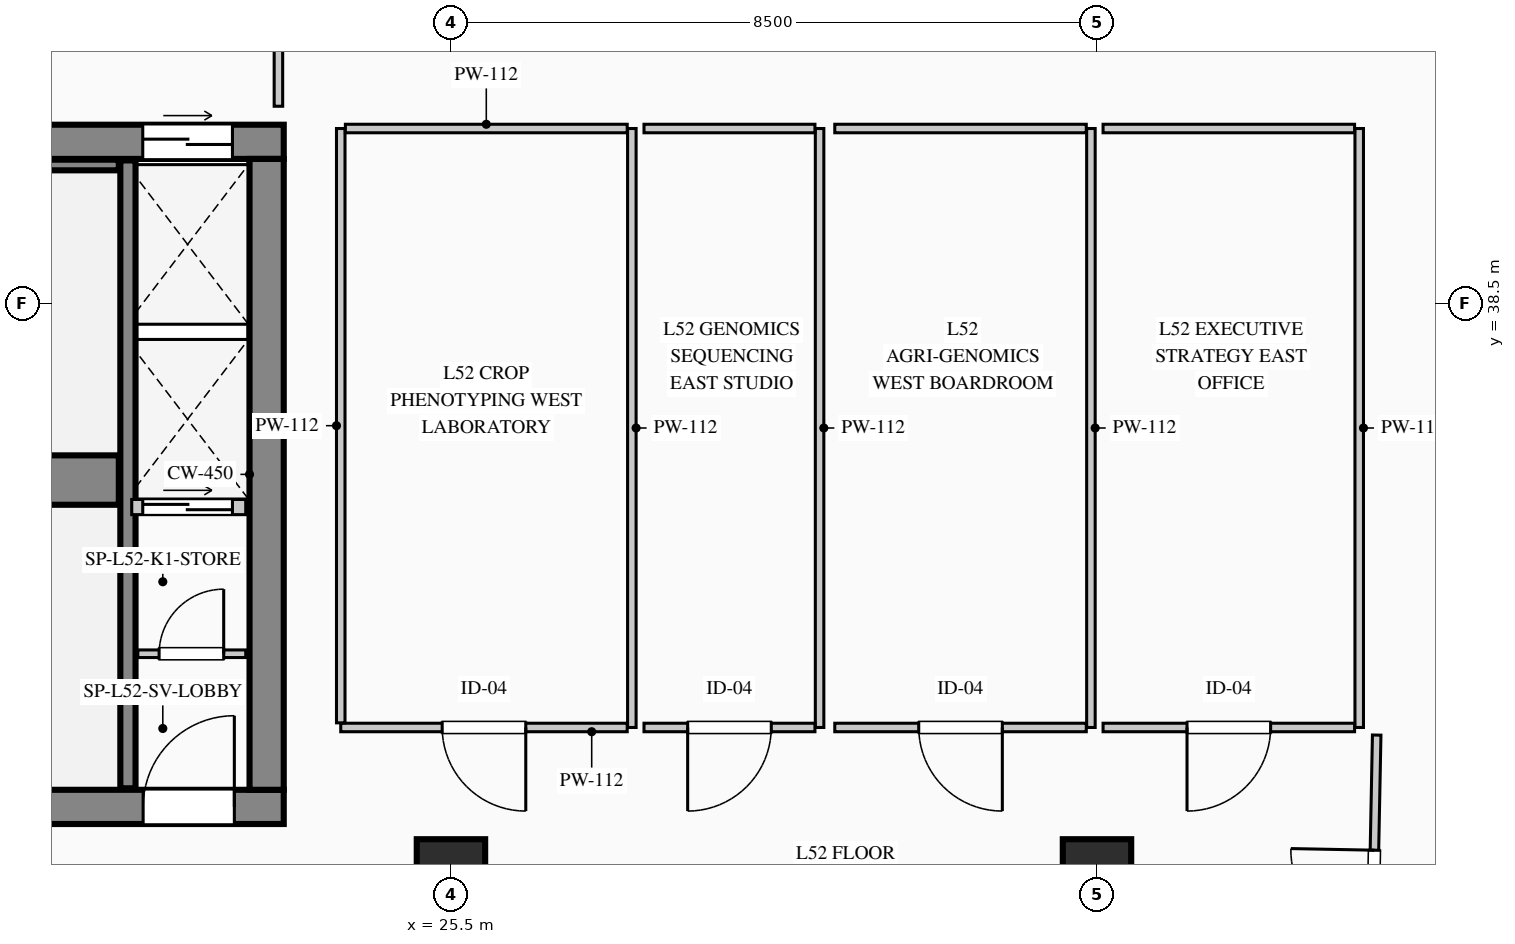
"""IFC4 building model, lengths in metres.
Left out: names, types, materials, properties, quantities, classifications, styles, units other than length and angle.
Written with IfcOpenShell. Run it as: python <this file> out.ifc"""

import sys

from ifc_helpers import new_model, si_unit, direction, frame, frame_2d, origin, origin_2d, place, context, subcontext, project, spatial, rectangle, extrude, element, fill, save


model = new_model("IFC4")
c1 = context("Model", 3, precision=1e-05, world=origin(), true_north=direction((0.0, 1.0)))
c2 = subcontext(c1, "Body", "Model", "MODEL_VIEW")
j1 = project(units=[si_unit("LENGTHUNIT", "METRE"), si_unit("PLANEANGLEUNIT", "RADIAN")], contexts=[c1])
p1 = place(None, origin())
s1 = spatial("IfcSite", under=j1, at=p1, CompositionType="ELEMENT")
p2 = place(p1, origin())
s2 = spatial("IfcBuilding", under=s1, at=p2, CompositionType="ELEMENT")
p3 = place(p2, frame((0.0, 0.0, 219.3)))
s3 = spatial("IfcBuildingStorey", under=s2, at=p3, CompositionType="ELEMENT", Elevation=219.3)
p4 = place(p3, frame((5.55, 40.625, 0.0), z_axis=(0.0, 0.0, 1.0), x_axis=(1.0, 0.0, 0.0)))
e1 = element("IfcWall", 1, at=p4, inside=s3, PredefinedType="SHEAR", context=c2, shape_type="SweptSolid", body=[
    extrude(rectangle(XDim=17.75, YDim=0.45, at=frame_2d((8.875, 0.0))), origin(), (0.0, 0.0, 1.0), 3.95),
])
p5 = place(p4, frame((15.895, 0.0, 0.0)))
e2 = element("IfcOpeningElement", 2, at=p5, cuts=e1, PredefinedType="OPENING", context=c2, shape_type="SweptSolid", body=[
    extrude(rectangle(XDim=1.18, YDim=2.25, at=frame_2d((0.59, 1.125))), frame((0.0, 0.235, 0.0), z_axis=(0.0, -1.0, 0.0), x_axis=(1.0, 0.0, 0.0)), (0.0, 0.0, 1.0), 0.47),
])
p6 = place(p3, frame((5.55, 31.875, 0.0), z_axis=(0.0, 0.0, 1.0), x_axis=(1.0, 0.0, 0.0)))
e3 = element("IfcWall", 3, at=p6, inside=s3, PredefinedType="SHEAR", context=c2, shape_type="SweptSolid", body=[
    extrude(rectangle(XDim=17.75, YDim=0.45, at=frame_2d((8.875, 0.0))), origin(), (0.0, 0.0, 1.0), 3.95),
])
p7 = place(p6, frame((3.1, 0.0, 0.0)))
e4 = element("IfcOpeningElement", 4, at=p7, cuts=e3, PredefinedType="OPENING", context=c2, shape_type="SweptSolid", body=[
    extrude(rectangle(XDim=1.2, YDim=2.2, at=frame_2d((0.6, 1.1))), frame((0.0, 0.235, 0.0), z_axis=(0.0, -1.0, 0.0), x_axis=(1.0, 0.0, 0.0)), (0.0, 0.0, 1.0), 0.47),
])
p8 = place(p6, frame((6.95, 0.0, 0.0)))
e5 = element("IfcOpeningElement", 5, at=p8, cuts=e3, PredefinedType="OPENING", context=c2, shape_type="SweptSolid", body=[
    extrude(rectangle(XDim=1.2, YDim=2.2, at=frame_2d((0.6, 1.1))), frame((0.0, 0.235, 0.0), z_axis=(0.0, -1.0, 0.0), x_axis=(1.0, 0.0, 0.0)), (0.0, 0.0, 1.0), 0.47),
])
p9 = place(p6, frame((8.8, 0.0, 0.0)))
e6 = element("IfcOpeningElement", 6, at=p9, cuts=e3, PredefinedType="OPENING", context=c2, shape_type="SweptSolid", body=[
    extrude(rectangle(XDim=1.15, YDim=2.2, at=frame_2d((0.575, 1.1))), frame((0.0, 0.235, 0.0), z_axis=(0.0, -1.0, 0.0), x_axis=(1.0, 0.0, 0.0)), (0.0, 0.0, 1.0), 0.47),
])
p10 = place(p6, frame((15.9, 0.0, 0.0)))
e7 = element("IfcOpeningElement", 7, at=p10, cuts=e3, PredefinedType="OPENING", context=c2, shape_type="SweptSolid", body=[
    extrude(rectangle(XDim=1.2, YDim=2.2, at=frame_2d((0.6, 1.1))), frame((0.0, 0.235, 0.0), z_axis=(0.0, -1.0, 0.0), x_axis=(1.0, 0.0, 0.0)), (0.0, 0.0, 1.0), 0.47),
])
p11 = place(p3, frame((23.075, 32.1, 0.0), z_axis=(0.0, 0.0, 1.0), x_axis=(0.0, 1.0, 0.0)))
e8 = element("IfcWall", 8, at=p11, inside=s3, PredefinedType="SHEAR", context=c2, shape_type="SweptSolid", body=[
    extrude(rectangle(XDim=8.3, YDim=0.45, at=frame_2d((4.15, 0.0))), origin(), (0.0, 0.0, 1.0), 3.95),
])
p12 = place(p3, frame((14.12, 36.175, 0.0), z_axis=(0.0, 0.0, 1.0), x_axis=(1.0, 0.0, 0.0)))
e9 = element("IfcWall", 9, at=p12, inside=s3, PredefinedType="SHEAR", context=c2, shape_type="SweptSolid", body=[
    extrude(rectangle(XDim=7.01, YDim=0.65, at=frame_2d((3.505, 0.0))), origin(), (0.0, 0.0, 1.0), 3.95),
])
p13 = place(p3, frame((21.25, 32.12, 0.0), z_axis=(0.0, 0.0, 1.0), x_axis=(0.0, 1.0, 0.0)))
e10 = element("IfcWall", 10, at=p13, inside=s3, PredefinedType="SHEAR", context=c2, shape_type="SweptSolid", body=[
    extrude(rectangle(XDim=8.26, YDim=0.2, at=frame_2d((4.13, 0.0))), origin(), (0.0, 0.0, 1.0), 3.95),
])
p14 = place(p3, frame((14.12, 40.32, 0.0), z_axis=(0.0, 0.0, 1.0), x_axis=(1.0, 0.0, 0.0)))
e11 = element("IfcWall", 11, at=p14, inside=s3, PredefinedType="SHEAR", context=c2, shape_type="SweptSolid", body=[
    extrude(rectangle(XDim=7.01, YDim=0.14, at=frame_2d((3.505, 0.0))), origin(), (0.0, 0.0, 1.0), 3.95),
])
for number, where, z_axis, x_axis in (
    (12, (25.5, 31.0, 0.0), (0.0, 0.0, 1.0), (1.0, 0.0, 0.0)),
    (13, (34.0, 31.0, 0.0), (0.0, 0.0, 1.0), (1.0, 0.0, 0.0)),
):
    element("IfcColumn", number, at=place(p3, frame(where, z_axis=z_axis, x_axis=x_axis)), inside=s3, PredefinedType="COLUMN", context=c2, shape_type="SweptSolid", body=[
        extrude(rectangle(XDim=0.9, YDim=0.9, at=origin_2d()), origin(), (0.0, 0.0, 1.0), 3.95),
    ])
p15 = place(p3, frame((21.38, 33.89, 0.0), z_axis=(0.0, 0.0, 1.0), x_axis=(1.0, 0.0, 0.0)))
e14 = element("IfcWall", 14, at=p15, inside=s3, PredefinedType="PARTITIONING", context=c2, shape_type="SweptSolid", body=[
    extrude(rectangle(XDim=1.42, YDim=0.1, at=frame_2d((0.71, 0.0))), origin(), (0.0, 0.0, 1.0), 3.7),
])
p16 = place(p15, frame((0.28, 0.0, 0.0)))
e15 = element("IfcOpeningElement", 15, at=p16, cuts=e14, PredefinedType="OPENING", context=c2, shape_type="SweptSolid", body=[
    extrude(rectangle(XDim=0.85, YDim=2.1, at=frame_2d((0.425, 1.05))), frame((0.0, 0.06, 0.0), z_axis=(0.0, -1.0, 0.0), x_axis=(1.0, 0.0, 0.0)), (0.0, 0.0, 1.0), 0.12),
])
p17 = place(p3, frame((21.3, 35.82, 0.0), z_axis=(0.0, 0.0, 1.0), x_axis=(1.0, 0.0, 0.0)))
e16 = element("IfcWall", 16, at=p17, inside=s3, PredefinedType="PARTITIONING", context=c2, shape_type="SweptSolid", body=[
    extrude(rectangle(XDim=1.5, YDim=0.2, at=frame_2d((0.75, 0.0))), origin(), (0.0, 0.0, 1.0), 3.7),
])
p18 = place(p17, frame((0.145, 0.0, 0.0)))
e17 = element("IfcOpeningElement", 17, at=p18, cuts=e16, PredefinedType="OPENING", context=c2, shape_type="SweptSolid", body=[
    extrude(rectangle(XDim=1.18, YDim=2.25, at=frame_2d((0.59, 1.125))), frame((0.0, 0.11, 0.0), z_axis=(0.0, -1.0, 0.0), x_axis=(1.0, 0.0, 0.0)), (0.0, 0.0, 1.0), 0.22),
])
p19 = place(p3, frame((27.88, 40.8, 0.0), z_axis=(0.0, 0.0, 1.0), x_axis=(0.0, -1.0, 0.0)))
e18 = element("IfcWall", 18, at=p19, inside=s3, PredefinedType="PARTITIONING", context=c2, shape_type="SweptSolid", body=[
    extrude(rectangle(XDim=7.88, YDim=0.112, at=frame_2d((3.94, 0.0))), origin(), (0.0, 0.0, 1.0), 3.7),
])
p20 = place(p3, frame((27.819, 32.92, 0.0), z_axis=(0.0, 0.0, 1.0), x_axis=(-1.0, 0.0, 0.0)))
e19 = element("IfcWall", 19, at=p20, inside=s3, PredefinedType="PARTITIONING", context=c2, shape_type="SweptSolid", body=[
    extrude(rectangle(XDim=3.769, YDim=0.112, at=frame_2d((1.885, 0.0))), origin(), (0.0, 0.0, 1.0), 3.7),
])
p21 = place(p20, frame((1.334, 0.0, 0.0)))
e20 = element("IfcOpeningElement", 20, at=p21, cuts=e19, PredefinedType="OPENING", context=c2, shape_type="SweptSolid", body=[
    extrude(rectangle(XDim=1.1, YDim=2.2, at=frame_2d((0.55, 1.1))), frame((0.0, 0.066, 0.0), z_axis=(0.0, -1.0, 0.0), x_axis=(1.0, 0.0, 0.0)), (0.0, 0.0, 1.0), 0.132),
])
p22 = place(p3, frame((24.05, 32.981, 0.0), z_axis=(0.0, 0.0, 1.0), x_axis=(0.0, 1.0, 0.0)))
e21 = element("IfcWall", 21, at=p22, inside=s3, PredefinedType="PARTITIONING", context=c2, shape_type="SweptSolid", body=[
    extrude(rectangle(XDim=7.819, YDim=0.112, at=frame_2d((3.91, 0.0))), origin(), (0.0, 0.0, 1.0), 3.7),
])
p23 = place(p3, frame((24.111, 40.8, 0.0), z_axis=(0.0, 0.0, 1.0), x_axis=(1.0, 0.0, 0.0)))
e22 = element("IfcWall", 22, at=p23, inside=s3, PredefinedType="PARTITIONING", context=c2, shape_type="SweptSolid", body=[
    extrude(rectangle(XDim=3.708, YDim=0.112, at=frame_2d((1.854, 0.0))), origin(), (0.0, 0.0, 1.0), 3.7),
])
p24 = place(p3, frame((30.35, 40.8, 0.0), z_axis=(0.0, 0.0, 1.0), x_axis=(0.0, -1.0, 0.0)))
e23 = element("IfcWall", 23, at=p24, inside=s3, PredefinedType="PARTITIONING", context=c2, shape_type="SweptSolid", body=[
    extrude(rectangle(XDim=7.88, YDim=0.112, at=frame_2d((3.94, 0.0))), origin(), (0.0, 0.0, 1.0), 3.7),
])
p25 = place(p3, frame((30.289, 32.92, 0.0), z_axis=(0.0, 0.0, 1.0), x_axis=(-1.0, 0.0, 0.0)))
e24 = element("IfcWall", 24, at=p25, inside=s3, PredefinedType="PARTITIONING", context=c2, shape_type="SweptSolid", body=[
    extrude(rectangle(XDim=2.249, YDim=0.112, at=frame_2d((1.125, 0.0))), origin(), (0.0, 0.0, 1.0), 3.7),
])
p26 = place(p25, frame((0.574, 0.0, 0.0)))
e25 = element("IfcOpeningElement", 25, at=p26, cuts=e24, PredefinedType="OPENING", context=c2, shape_type="SweptSolid", body=[
    extrude(rectangle(XDim=1.1, YDim=2.2, at=frame_2d((0.55, 1.1))), frame((0.0, 0.066, 0.0), z_axis=(0.0, -1.0, 0.0), x_axis=(1.0, 0.0, 0.0)), (0.0, 0.0, 1.0), 0.132),
])
p27 = place(p3, frame((28.04, 40.8, 0.0), z_axis=(0.0, 0.0, 1.0), x_axis=(1.0, 0.0, 0.0)))
e26 = element("IfcWall", 26, at=p27, inside=s3, PredefinedType="PARTITIONING", context=c2, shape_type="SweptSolid", body=[
    extrude(rectangle(XDim=2.249, YDim=0.112, at=frame_2d((1.125, 0.0))), origin(), (0.0, 0.0, 1.0), 3.7),
])
p28 = place(p3, frame((33.92, 40.8, 0.0), z_axis=(0.0, 0.0, 1.0), x_axis=(0.0, -1.0, 0.0)))
e27 = element("IfcWall", 27, at=p28, inside=s3, PredefinedType="PARTITIONING", context=c2, shape_type="SweptSolid", body=[
    extrude(rectangle(XDim=7.88, YDim=0.112, at=frame_2d((3.94, 0.0))), origin(), (0.0, 0.0, 1.0), 3.7),
])
p29 = place(p3, frame((33.859, 32.92, 0.0), z_axis=(0.0, 0.0, 1.0), x_axis=(-1.0, 0.0, 0.0)))
e28 = element("IfcWall", 28, at=p29, inside=s3, PredefinedType="PARTITIONING", context=c2, shape_type="SweptSolid", body=[
    extrude(rectangle(XDim=3.309, YDim=0.112, at=frame_2d((1.654, 0.0))), origin(), (0.0, 0.0, 1.0), 3.7),
])
p30 = place(p29, frame((1.104, 0.0, 0.0)))
e29 = element("IfcOpeningElement", 29, at=p30, cuts=e28, PredefinedType="OPENING", context=c2, shape_type="SweptSolid", body=[
    extrude(rectangle(XDim=1.1, YDim=2.2, at=frame_2d((0.55, 1.1))), frame((0.0, 0.066, 0.0), z_axis=(0.0, -1.0, 0.0), x_axis=(1.0, 0.0, 0.0)), (0.0, 0.0, 1.0), 0.132),
])
p31 = place(p3, frame((30.55, 40.8, 0.0), z_axis=(0.0, 0.0, 1.0), x_axis=(1.0, 0.0, 0.0)))
e30 = element("IfcWall", 30, at=p31, inside=s3, PredefinedType="PARTITIONING", context=c2, shape_type="SweptSolid", body=[
    extrude(rectangle(XDim=3.309, YDim=0.112, at=frame_2d((1.654, 0.0))), origin(), (0.0, 0.0, 1.0), 3.7),
])
p32 = place(p3, frame((37.45, 40.8, 0.0), z_axis=(0.0, 0.0, 1.0), x_axis=(0.0, -1.0, 0.0)))
e31 = element("IfcWall", 31, at=p32, inside=s3, PredefinedType="PARTITIONING", context=c2, shape_type="SweptSolid", body=[
    extrude(rectangle(XDim=7.88, YDim=0.112, at=frame_2d((3.94, 0.0))), origin(), (0.0, 0.0, 1.0), 3.7),
])
p33 = place(p3, frame((37.389, 32.92, 0.0), z_axis=(0.0, 0.0, 1.0), x_axis=(-1.0, 0.0, 0.0)))
e32 = element("IfcWall", 32, at=p33, inside=s3, PredefinedType="PARTITIONING", context=c2, shape_type="SweptSolid", body=[
    extrude(rectangle(XDim=3.309, YDim=0.112, at=frame_2d((1.654, 0.0))), origin(), (0.0, 0.0, 1.0), 3.7),
])
p34 = place(p33, frame((1.104, 0.0, 0.0)))
e33 = element("IfcOpeningElement", 33, at=p34, cuts=e32, PredefinedType="OPENING", context=c2, shape_type="SweptSolid", body=[
    extrude(rectangle(XDim=1.1, YDim=2.2, at=frame_2d((0.55, 1.1))), frame((0.0, 0.066, 0.0), z_axis=(0.0, -1.0, 0.0), x_axis=(1.0, 0.0, 0.0)), (0.0, 0.0, 1.0), 0.132),
])
p35 = place(p3, frame((34.08, 40.8, 0.0), z_axis=(0.0, 0.0, 1.0), x_axis=(1.0, 0.0, 0.0)))
e34 = element("IfcWall", 34, at=p35, inside=s3, PredefinedType="PARTITIONING", context=c2, shape_type="SweptSolid", body=[
    extrude(rectangle(XDim=3.309, YDim=0.112, at=frame_2d((1.654, 0.0))), origin(), (0.0, 0.0, 1.0), 3.7),
])
p36 = place(p3, frame((37.599, 28.691, 0.0), z_axis=(0.0, 0.0, 1.0), x_axis=(0.019566997539, 0.999808547977, 0.0)))
e35 = element("IfcWall", 35, at=p36, inside=s3, PredefinedType="PARTITIONING", context=c2, shape_type="SweptSolid", body=[
    extrude(rectangle(XDim=4.13, YDim=0.112, at=frame_2d((2.065, 0.0))), origin(), (0.0, 0.0, 1.0), 3.7),
])
p37 = place(p36, frame((1.515, 0.0, 0.0)))
e36 = element("IfcOpeningElement", 36, at=p37, cuts=e35, PredefinedType="OPENING", context=c2, shape_type="SweptSolid", body=[
    extrude(rectangle(XDim=1.1, YDim=2.2, at=frame_2d((0.55, 1.1))), frame((0.0, 0.066, 0.0), z_axis=(0.0, -1.0, 0.0), x_axis=(1.0, 0.0, 0.0)), (0.0, 0.0, 1.0), 0.132),
])
p38 = place(p3, frame((23.23, 41.093, 0.0), z_axis=(0.0, 0.0, 1.0), x_axis=(0.0, 1.0, 0.0)))
e37 = element("IfcWall", 37, at=p38, inside=s3, PredefinedType="PARTITIONING", context=c2, shape_type="SweptSolid", body=[
    extrude(rectangle(XDim=2.162, YDim=0.112, at=frame_2d((1.081, 0.0))), origin(), (0.0, 0.0, 1.0), 3.7),
])
p39 = place(p10, origin())
e38 = element("IfcDoor", 38, at=p39, inside=s3, OperationType="SINGLE_SWING_RIGHT", PredefinedType="DOOR", context=c2, shape_type="SweptSolid", body=[
    extrude(rectangle(XDim=1.2, YDim=2.2, at=frame_2d((0.6, 1.1))), frame((0.0, 0.025, 0.0), z_axis=(0.0, -1.0, 0.0), x_axis=(1.0, 0.0, 0.0)), (0.0, 0.0, 1.0), 0.05),
])
fill(e7, e38)
p40 = place(p16, origin())
e39 = element("IfcDoor", 39, at=p40, inside=s3, OperationType="SINGLE_SWING_RIGHT", PredefinedType="DOOR", context=c2, shape_type="SweptSolid", body=[
    extrude(rectangle(XDim=0.85, YDim=2.1, at=frame_2d((0.425, 1.05))), frame((0.0, 0.025, 0.0), z_axis=(0.0, -1.0, 0.0), x_axis=(1.0, 0.0, 0.0)), (0.0, 0.0, 1.0), 0.05),
])
fill(e15, e39)
p41 = place(p5, origin())
e40 = element("IfcDoor", 40, at=p41, inside=s3, OperationType="DOUBLE_DOOR_SLIDING", PredefinedType="DOOR", context=c2, shape_type="SweptSolid", body=[
    extrude(rectangle(XDim=1.18, YDim=2.25, at=frame_2d((0.59, 1.125))), frame((0.0, 0.025, 0.0), z_axis=(0.0, -1.0, 0.0), x_axis=(1.0, 0.0, 0.0)), (0.0, 0.0, 1.0), 0.05),
])
fill(e2, e40)
p42 = place(p18, origin())
e41 = element("IfcDoor", 41, at=p42, inside=s3, OperationType="DOUBLE_DOOR_SLIDING", PredefinedType="DOOR", context=c2, shape_type="SweptSolid", body=[
    extrude(rectangle(XDim=1.18, YDim=2.25, at=frame_2d((0.59, 1.125))), frame((0.0, 0.025, 0.0), z_axis=(0.0, -1.0, 0.0), x_axis=(1.0, 0.0, 0.0)), (0.0, 0.0, 1.0), 0.05),
])
fill(e17, e41)
p43 = place(p21, origin())
e42 = element("IfcDoor", 42, at=p43, inside=s3, OperationType="SINGLE_SWING_LEFT", PredefinedType="DOOR", context=c2, shape_type="SweptSolid", body=[
    extrude(rectangle(XDim=1.1, YDim=2.2, at=frame_2d((0.55, 1.1))), frame((0.0, 0.025, 0.0), z_axis=(0.0, -1.0, 0.0), x_axis=(1.0, 0.0, 0.0)), (0.0, 0.0, 1.0), 0.05),
])
fill(e20, e42)
p44 = place(p26, origin())
e43 = element("IfcDoor", 43, at=p44, inside=s3, OperationType="SINGLE_SWING_RIGHT", PredefinedType="DOOR", context=c2, shape_type="SweptSolid", body=[
    extrude(rectangle(XDim=1.1, YDim=2.2, at=frame_2d((0.55, 1.1))), frame((0.0, 0.025, 0.0), z_axis=(0.0, -1.0, 0.0), x_axis=(1.0, 0.0, 0.0)), (0.0, 0.0, 1.0), 0.05),
])
fill(e25, e43)
p45 = place(p30, origin())
e44 = element("IfcDoor", 44, at=p45, inside=s3, OperationType="SINGLE_SWING_LEFT", PredefinedType="DOOR", context=c2, shape_type="SweptSolid", body=[
    extrude(rectangle(XDim=1.1, YDim=2.2, at=frame_2d((0.55, 1.1))), frame((0.0, 0.025, 0.0), z_axis=(0.0, -1.0, 0.0), x_axis=(1.0, 0.0, 0.0)), (0.0, 0.0, 1.0), 0.05),
])
fill(e29, e44)
p46 = place(p34, origin())
e45 = element("IfcDoor", 45, at=p46, inside=s3, OperationType="SINGLE_SWING_RIGHT", PredefinedType="DOOR", context=c2, shape_type="SweptSolid", body=[
    extrude(rectangle(XDim=1.1, YDim=2.2, at=frame_2d((0.55, 1.1))), frame((0.0, 0.025, 0.0), z_axis=(0.0, -1.0, 0.0), x_axis=(1.0, 0.0, 0.0)), (0.0, 0.0, 1.0), 0.05),
])
fill(e33, e45)
p47 = place(p37, origin())
e46 = element("IfcDoor", 46, at=p47, inside=s3, OperationType="SINGLE_SWING_RIGHT", PredefinedType="DOOR", context=c2, shape_type="SweptSolid", body=[
    extrude(rectangle(XDim=1.1, YDim=2.2, at=frame_2d((0.55, 1.1))), frame((0.0, 0.025, 0.0), z_axis=(0.0, -1.0, 0.0), x_axis=(1.0, 0.0, 0.0)), (0.0, 0.0, 1.0), 0.05),
])
fill(e36, e46)
save(model, sys.argv[1])
